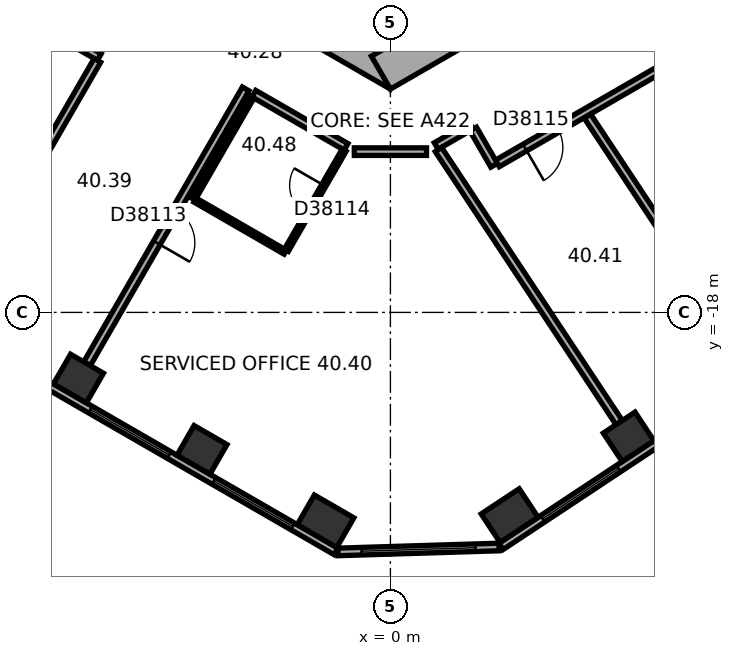
"""IFC4 building model, lengths in metres.
Left out: names, types, materials, properties, quantities, classifications, styles, units other than length and angle.
Written with IfcOpenShell. Run it as: python <this file> out.ifc"""

import sys

from ifc_helpers import new_model, si_unit, direction, frame, frame_2d, origin, origin_2d, place, context, subcontext, project, spatial, rectangle, extrude, element, fill, save


model = new_model("IFC4")
c1 = context("Model", 3, precision=1e-05, world=origin(), true_north=direction((0.0, 1.0)))
c2 = subcontext(c1, "Body", "Model", "MODEL_VIEW")
j1 = project(units=[si_unit("LENGTHUNIT", "METRE"), si_unit("PLANEANGLEUNIT", "RADIAN")], contexts=[c1])
p1 = place(None, origin())
s1 = spatial("IfcSite", under=j1, at=p1, CompositionType="ELEMENT")
p2 = place(p1, origin())
s2 = spatial("IfcBuilding", under=s1, at=p2, CompositionType="ELEMENT")
p3 = place(p2, frame((0.0, 0.0, 165.1)))
s3 = spatial("IfcBuildingStorey", under=s2, at=p3, CompositionType="ELEMENT", Elevation=165.1)
for number, where, z_axis, x_axis in (
    (1, (-8.208, -19.74, 0.0), (0.0, 0.0, 1.0), (0.866, -0.5, 0.0)),
    (2, (-4.958, -21.617, 0.0), (0.0, 0.0, 1.0), (0.866, -0.5, 0.0)),
):
    element("IfcColumn", number, at=place(p3, frame(where, z_axis=z_axis, x_axis=x_axis)), inside=s3, PredefinedType="COLUMN", context=c2, shape_type="SweptSolid", body=[
        extrude(rectangle(XDim=1.0, YDim=0.9, at=origin_2d()), origin(), (0.0, 0.0, 1.0), 3.7),
    ])
for number, where, z_axis, x_axis in (
    (3, (-1.706, -23.494, 0.0), (0.0, 0.0, 1.0), (0.866, -0.5, 0.0)),
    (4, (3.137, -23.346, 0.0), (0.0, 0.0, 1.0), (0.834, 0.552, 0.0)),
):
    element("IfcColumn", number, at=place(p3, frame(where, z_axis=z_axis, x_axis=x_axis)), inside=s3, PredefinedType="COLUMN", context=c2, shape_type="SweptSolid", body=[
        extrude(rectangle(XDim=1.2, YDim=0.9, at=origin_2d()), origin(), (0.0, 0.0, 1.0), 3.7),
    ])
p4 = place(p3, frame((6.268, -21.274, 0.0), z_axis=(0.0, 0.0, 1.0), x_axis=(0.833885822067, 0.551936985312, 0.0)))
e5 = element("IfcColumn", 5, at=p4, inside=s3, PredefinedType="COLUMN", context=c2, shape_type="SweptSolid", body=[
    extrude(rectangle(XDim=1.0, YDim=0.9, at=origin_2d()), origin(), (0.0, 0.0, 1.0), 3.7),
])
p5 = place(p3, frame((-10.25, -5.629, 0.0), z_axis=(0.0, 0.0, 1.0), x_axis=(0.866022616891, -0.50000482701, 0.0)))
e6 = element("IfcWall", 6, at=p5, inside=s3, PredefinedType="SHEAR", context=c2, shape_type="SweptSolid", body=[
    extrude(rectangle(XDim=12.125, YDim=1.0, at=frame_2d((6.062, 0.0))), origin(), (0.0, 0.0, 1.0), 3.7),
])
p6 = place(p5, frame((6.262, 0.0, 0.0)))
e7 = element("IfcOpeningElement", 7, at=p6, cuts=e6, PredefinedType="OPENING", context=c2, shape_type="SweptSolid", body=[
    extrude(rectangle(XDim=1.5, YDim=2.1, at=frame_2d((0.75, 1.05))), frame((0.0, 0.51, 0.0), z_axis=(0.0, -1.0, 0.0), x_axis=(1.0, 0.0, 0.0)), (0.0, 0.0, 1.0), 1.02),
])
p7 = place(p5, frame((1.712, 0.0, 0.0)))
e8 = element("IfcOpeningElement", 8, at=p7, cuts=e6, PredefinedType="OPENING", context=c2, shape_type="SweptSolid", body=[
    extrude(rectangle(XDim=1.1, YDim=2.1, at=frame_2d((0.55, 1.05))), frame((0.0, 0.51, 0.0), z_axis=(0.0, -1.0, 0.0), x_axis=(1.0, 0.0, 0.0)), (0.0, 0.0, 1.0), 1.02),
])
p8 = place(p5, frame((4.312, 0.0, 0.0)))
e9 = element("IfcOpeningElement", 9, at=p8, cuts=e6, PredefinedType="OPENING", context=c2, shape_type="SweptSolid", body=[
    extrude(rectangle(XDim=1.1, YDim=2.1, at=frame_2d((0.55, 1.05))), frame((0.0, 0.51, 0.0), z_axis=(0.0, -1.0, 0.0), x_axis=(1.0, 0.0, 0.0)), (0.0, 0.0, 1.0), 1.02),
])
p9 = place(p3, frame((-0.25, -11.691, 0.0), z_axis=(0.0, 0.0, 1.0), x_axis=(0.866022616891, 0.50000482701, 0.0)))
e10 = element("IfcWall", 10, at=p9, inside=s3, PredefinedType="SHEAR", context=c2, shape_type="SweptSolid", body=[
    extrude(rectangle(XDim=12.125, YDim=1.0, at=frame_2d((6.062, 0.0))), origin(), (0.0, 0.0, 1.0), 3.7),
])
p10 = place(p9, frame((2.612, 0.0, 0.0)))
e11 = element("IfcOpeningElement", 11, at=p10, cuts=e10, PredefinedType="OPENING", context=c2, shape_type="SweptSolid", body=[
    extrude(rectangle(XDim=1.1, YDim=2.1, at=frame_2d((0.55, 1.05))), frame((0.0, 0.51, 0.0), z_axis=(0.0, -1.0, 0.0), x_axis=(1.0, 0.0, 0.0)), (0.0, 0.0, 1.0), 1.02),
])
p11 = place(p9, frame((5.212, 0.0, 0.0)))
e12 = element("IfcOpeningElement", 12, at=p11, cuts=e10, PredefinedType="OPENING", context=c2, shape_type="SweptSolid", body=[
    extrude(rectangle(XDim=1.1, YDim=2.1, at=frame_2d((0.55, 1.05))), frame((0.0, 0.51, 0.0), z_axis=(0.0, -1.0, 0.0), x_axis=(1.0, 0.0, 0.0)), (0.0, 0.0, 1.0), 1.02),
])
p12 = place(p9, frame((7.812, 0.0, 0.0)))
e13 = element("IfcOpeningElement", 13, at=p12, cuts=e10, PredefinedType="OPENING", context=c2, shape_type="SweptSolid", body=[
    extrude(rectangle(XDim=1.1, YDim=2.1, at=frame_2d((0.55, 1.05))), frame((0.0, 0.51, 0.0), z_axis=(0.0, -1.0, 0.0), x_axis=(1.0, 0.0, 0.0)), (0.0, 0.0, 1.0), 1.02),
])
p13 = place(p3, frame((-18.789, -14.267, 0.0), z_axis=(0.0, 0.0, 1.0), x_axis=(0.866023315909, -0.500003616288, 0.0)))
e14 = element("IfcWall", 14, at=p13, inside=s3, PredefinedType="STANDARD", context=c2, shape_type="SweptSolid", body=[
    extrude(rectangle(XDim=20.044, YDim=0.2, at=frame_2d((10.022, 0.0))), origin(), (0.0, 0.0, 1.0), 3.7),
])
p14 = place(p13, frame((1.314, 0.0, 0.9)))
e15 = element("IfcOpeningElement", 15, at=p14, cuts=e14, PredefinedType="OPENING", context=c2, shape_type="SweptSolid", body=[
    extrude(rectangle(XDim=2.4, YDim=2.0, at=frame_2d((1.2, 1.0))), frame((0.0, 0.11, 0.0), z_axis=(0.0, -1.0, 0.0), x_axis=(1.0, 0.0, 0.0)), (0.0, 0.0, 1.0), 0.22),
])
p15 = place(p13, frame((5.069, 0.0, 0.9)))
e16 = element("IfcOpeningElement", 16, at=p15, cuts=e14, PredefinedType="OPENING", context=c2, shape_type="SweptSolid", body=[
    extrude(rectangle(XDim=2.4, YDim=2.0, at=frame_2d((1.2, 1.0))), frame((0.0, 0.11, 0.0), z_axis=(0.0, -1.0, 0.0), x_axis=(1.0, 0.0, 0.0)), (0.0, 0.0, 1.0), 0.22),
])
p16 = place(p13, frame((8.823, 0.0, 0.9)))
e17 = element("IfcOpeningElement", 17, at=p16, cuts=e14, PredefinedType="OPENING", context=c2, shape_type="SweptSolid", body=[
    extrude(rectangle(XDim=2.4, YDim=2.0, at=frame_2d((1.2, 1.0))), frame((0.0, 0.11, 0.0), z_axis=(0.0, -1.0, 0.0), x_axis=(1.0, 0.0, 0.0)), (0.0, 0.0, 1.0), 0.22),
])
p17 = place(p13, frame((12.577, 0.0, 0.9)))
e18 = element("IfcOpeningElement", 18, at=p17, cuts=e14, PredefinedType="OPENING", context=c2, shape_type="SweptSolid", body=[
    extrude(rectangle(XDim=2.4, YDim=2.0, at=frame_2d((1.2, 1.0))), frame((0.0, 0.11, 0.0), z_axis=(0.0, -1.0, 0.0), x_axis=(1.0, 0.0, 0.0)), (0.0, 0.0, 1.0), 0.22),
])
p18 = place(p13, frame((16.331, 0.0, 0.9)))
e19 = element("IfcOpeningElement", 19, at=p18, cuts=e14, PredefinedType="OPENING", context=c2, shape_type="SweptSolid", body=[
    extrude(rectangle(XDim=2.4, YDim=2.0, at=frame_2d((1.2, 1.0))), frame((0.0, 0.11, 0.0), z_axis=(0.0, -1.0, 0.0), x_axis=(1.0, 0.0, 0.0)), (0.0, 0.0, 1.0), 0.22),
])
p19 = place(p3, frame((-1.378, -24.302, 0.0), z_axis=(0.0, 0.0, 1.0), x_axis=(0.999533857267, 0.030529791629, 0.0)))
e20 = element("IfcWall", 20, at=p19, inside=s3, PredefinedType="STANDARD", context=c2, shape_type="SweptSolid", body=[
    extrude(rectangle(XDim=4.238, YDim=0.2, at=frame_2d((2.119, 0.0))), origin(), (0.0, 0.0, 1.0), 3.7),
])
p20 = place(p19, frame((0.619, 0.0, 0.9)))
e21 = element("IfcOpeningElement", 21, at=p20, cuts=e20, PredefinedType="OPENING", context=c2, shape_type="SweptSolid", body=[
    extrude(rectangle(XDim=3.0, YDim=2.0, at=frame_2d((1.5, 1.0))), frame((0.0, 0.11, 0.0), z_axis=(0.0, -1.0, 0.0), x_axis=(1.0, 0.0, 0.0)), (0.0, 0.0, 1.0), 0.22),
])
p21 = place(p3, frame((2.911, -24.156, 0.0), z_axis=(0.0, 0.0, 1.0), x_axis=(0.833882163564, 0.551942512668, 0.0)))
e22 = element("IfcWall", 22, at=p21, inside=s3, PredefinedType="STANDARD", context=c2, shape_type="SweptSolid", body=[
    extrude(rectangle(XDim=20.044, YDim=0.2, at=frame_2d((10.022, 0.0))), origin(), (0.0, 0.0, 1.0), 3.7),
])
p22 = place(p21, frame((1.313, 0.0, 0.9)))
e23 = element("IfcOpeningElement", 23, at=p22, cuts=e22, PredefinedType="OPENING", context=c2, shape_type="SweptSolid", body=[
    extrude(rectangle(XDim=2.4, YDim=2.0, at=frame_2d((1.2, 1.0))), frame((0.0, 0.11, 0.0), z_axis=(0.0, -1.0, 0.0), x_axis=(1.0, 0.0, 0.0)), (0.0, 0.0, 1.0), 0.22),
])
p23 = place(p21, frame((5.067, 0.0, 0.9)))
e24 = element("IfcOpeningElement", 24, at=p23, cuts=e22, PredefinedType="OPENING", context=c2, shape_type="SweptSolid", body=[
    extrude(rectangle(XDim=2.4, YDim=2.0, at=frame_2d((1.2, 1.0))), frame((0.0, 0.11, 0.0), z_axis=(0.0, -1.0, 0.0), x_axis=(1.0, 0.0, 0.0)), (0.0, 0.0, 1.0), 0.22),
])
p24 = place(p21, frame((8.821, 0.0, 0.9)))
e25 = element("IfcOpeningElement", 25, at=p24, cuts=e22, PredefinedType="OPENING", context=c2, shape_type="SweptSolid", body=[
    extrude(rectangle(XDim=2.4, YDim=2.0, at=frame_2d((1.2, 1.0))), frame((0.0, 0.11, 0.0), z_axis=(0.0, -1.0, 0.0), x_axis=(1.0, 0.0, 0.0)), (0.0, 0.0, 1.0), 0.22),
])
p25 = place(p21, frame((12.575, 0.0, 0.9)))
e26 = element("IfcOpeningElement", 26, at=p25, cuts=e22, PredefinedType="OPENING", context=c2, shape_type="SweptSolid", body=[
    extrude(rectangle(XDim=2.4, YDim=2.0, at=frame_2d((1.2, 1.0))), frame((0.0, 0.11, 0.0), z_axis=(0.0, -1.0, 0.0), x_axis=(1.0, 0.0, 0.0)), (0.0, 0.0, 1.0), 0.22),
])
p26 = place(p21, frame((16.329, 0.0, 0.9)))
e27 = element("IfcOpeningElement", 27, at=p26, cuts=e22, PredefinedType="OPENING", context=c2, shape_type="SweptSolid", body=[
    extrude(rectangle(XDim=2.4, YDim=2.0, at=frame_2d((1.2, 1.0))), frame((0.0, 0.11, 0.0), z_axis=(0.0, -1.0, 0.0), x_axis=(1.0, 0.0, 0.0)), (0.0, 0.0, 1.0), 0.22),
])
p27 = place(p3, frame((-11.651, -8.978, 0.0), z_axis=(0.0, 0.0, 1.0), x_axis=(0.866010893236, -0.500025132165, 0.0)))
e28 = element("IfcWall", 28, at=p27, inside=s3, PredefinedType="PARTITIONING", context=c2, shape_type="SweptSolid", body=[
    extrude(rectangle(XDim=4.608, YDim=0.2, at=frame_2d((2.304, 0.0))), origin(), (0.0, 0.0, 1.0), 3.42),
])
p28 = place(p3, frame((-11.235, -17.474, 0.0), z_axis=(0.0, 0.0, 1.0), x_axis=(0.500009260695, 0.866020057054, 0.0)))
e29 = element("IfcWall", 29, at=p28, inside=s3, PredefinedType="PARTITIONING", context=c2, shape_type="SweptSolid", body=[
    extrude(rectangle(XDim=7.049, YDim=0.2, at=frame_2d((3.524, 0.0))), origin(), (0.0, 0.0, 1.0), 2.87),
])
p29 = place(p28, frame((3.024, 0.0, 0.0)))
e30 = element("IfcOpeningElement", 30, at=p29, cuts=e29, PredefinedType="OPENING", context=c2, shape_type="SweptSolid", body=[
    extrude(rectangle(XDim=1.0, YDim=2.1, at=frame_2d((0.5, 1.05))), frame((0.0, 0.11, 0.0), z_axis=(0.0, -1.0, 0.0), x_axis=(1.0, 0.0, 0.0)), (0.0, 0.0, 1.0), 0.22),
])
p30 = place(p3, frame((-7.984, -19.351, 0.0), z_axis=(0.0, 0.0, 1.0), x_axis=(0.500010139422, 0.866019549707, 0.0)))
e31 = element("IfcWall", 31, at=p30, inside=s3, PredefinedType="PARTITIONING", context=c2, shape_type="SweptSolid", body=[
    extrude(rectangle(XDim=8.35, YDim=0.2, at=frame_2d((4.175, 0.0))), origin(), (0.0, 0.0, 1.0), 3.42),
])
p31 = place(p30, frame((3.675, 0.0, 0.0)))
e32 = element("IfcOpeningElement", 32, at=p31, cuts=e31, PredefinedType="OPENING", context=c2, shape_type="SweptSolid", body=[
    extrude(rectangle(XDim=1.0, YDim=2.1, at=frame_2d((0.5, 1.05))), frame((0.0, 0.11, 0.0), z_axis=(0.0, -1.0, 0.0), x_axis=(1.0, 0.0, 0.0)), (0.0, 0.0, 1.0), 0.22),
])
p32 = place(p3, frame((-5.192, -15.016, 0.0), z_axis=(0.0, 0.0, 1.0), x_axis=(0.500026960575, 0.86600983753, 0.0)))
e33 = element("IfcWall", 33, at=p32, inside=s3, PredefinedType="PARTITIONING", context=c2, shape_type="SweptSolid", body=[
    extrude(rectangle(XDim=3.1, YDim=0.12, at=frame_2d((1.55, 0.0))), origin(), (0.0, 0.0, 1.0), 3.42),
])
p33 = place(p3, frame((-3.592, -12.244, 0.0), z_axis=(0.0, 0.0, 1.0), x_axis=(0.866034573852, -0.49998411664, 0.0)))
e34 = element("IfcWall", 34, at=p33, inside=s3, PredefinedType="PARTITIONING", context=c2, shape_type="SweptSolid", body=[
    extrude(rectangle(XDim=2.8, YDim=0.2, at=frame_2d((1.4, 0.0))), origin(), (0.0, 0.0, 1.0), 3.42),
])
p34 = place(p3, frame((-2.767, -16.416, 0.0), z_axis=(0.0, 0.0, 1.0), x_axis=(-0.865997131366, 0.500048966069, 0.0)))
e35 = element("IfcWall", 35, at=p34, inside=s3, PredefinedType="PARTITIONING", context=c2, shape_type="SweptSolid", body=[
    extrude(rectangle(XDim=2.74, YDim=0.12, at=frame_2d((1.37, 0.0))), origin(), (0.0, 0.0, 1.0), 3.42),
])
p35 = place(p3, frame((-1.217, -13.731, 0.0), z_axis=(0.0, 0.0, 1.0), x_axis=(-0.499991248344, -0.866030456496, 0.0)))
e36 = element("IfcWall", 36, at=p35, inside=s3, PredefinedType="PARTITIONING", context=c2, shape_type="SweptSolid", body=[
    extrude(rectangle(XDim=3.04, YDim=0.12, at=frame_2d((1.52, 0.0))), origin(), (0.0, 0.0, 1.0), 3.42),
])
p36 = place(p35, frame((1.07, 0.0, 0.0)))
e37 = element("IfcOpeningElement", 37, at=p36, cuts=e36, PredefinedType="OPENING", context=c2, shape_type="SweptSolid", body=[
    extrude(rectangle(XDim=0.9, YDim=2.1, at=frame_2d((0.45, 1.05))), frame((0.0, 0.07, 0.0), z_axis=(0.0, -1.0, 0.0), x_axis=(1.0, 0.0, 0.0)), (0.0, 0.0, 1.0), 0.14),
])
p37 = place(p3, frame((-0.95, -13.77, 0.0), z_axis=(0.0, 0.0, 1.0), x_axis=(1.0, 0.0, 0.0)))
e38 = element("IfcWall", 38, at=p37, inside=s3, PredefinedType="PARTITIONING", context=c2, shape_type="SweptSolid", body=[
    extrude(rectangle(XDim=1.9, YDim=0.2, at=frame_2d((0.95, 0.0))), origin(), (0.0, 0.0, 1.0), 3.42),
])
p38 = place(p3, frame((1.204, -13.623, 0.0), z_axis=(0.0, 0.0, 1.0), x_axis=(0.866040989419, 0.499973003918, 0.0)))
e39 = element("IfcWall", 39, at=p38, inside=s3, PredefinedType="PARTITIONING", context=c2, shape_type="SweptSolid", body=[
    extrude(rectangle(XDim=1.068, YDim=0.2, at=frame_2d((0.534, 0.0))), origin(), (0.0, 0.0, 1.0), 3.42),
])
p39 = place(p3, frame((2.179, -13.176, 0.0), z_axis=(0.0, 0.0, 1.0), x_axis=(0.499978356969, -0.866037899034, 0.0)))
e40 = element("IfcWall", 40, at=p39, inside=s3, PredefinedType="PARTITIONING", context=c2, shape_type="SweptSolid", body=[
    extrude(rectangle(XDim=1.101, YDim=0.2, at=frame_2d((0.551, 0.0))), origin(), (0.0, 0.0, 1.0), 3.42),
])
p40 = place(p3, frame((2.816, -14.079, 0.0), z_axis=(0.0, 0.0, 1.0), x_axis=(0.866021128829, 0.500007404367, 0.0)))
e41 = element("IfcWall", 41, at=p40, inside=s3, PredefinedType="PARTITIONING", context=c2, shape_type="SweptSolid", body=[
    extrude(rectangle(XDim=8.702, YDim=0.2, at=frame_2d((4.351, 0.0))), origin(), (0.0, 0.0, 1.0), 3.42),
])
p41 = place(p40, frame((0.833, 0.0, 0.0)))
e42 = element("IfcOpeningElement", 42, at=p41, cuts=e41, PredefinedType="OPENING", context=c2, shape_type="SweptSolid", body=[
    extrude(rectangle(XDim=1.0, YDim=2.1, at=frame_2d((0.5, 1.05))), frame((0.0, 0.11, 0.0), z_axis=(0.0, -1.0, 0.0), x_axis=(1.0, 0.0, 0.0)), (0.0, 0.0, 1.0), 0.22),
])
p42 = place(p3, frame((6.02, -20.899, 0.0), z_axis=(0.0, 0.0, 1.0), x_axis=(-0.551943990108, 0.833881185651, 0.0)))
e43 = element("IfcWall", 43, at=p42, inside=s3, PredefinedType="PARTITIONING", context=c2, shape_type="SweptSolid", body=[
    extrude(rectangle(XDim=8.615, YDim=0.2, at=frame_2d((4.308, 0.0))), origin(), (0.0, 0.0, 1.0), 3.42),
])
p43 = place(p3, frame((9.15, -18.827, 0.0), z_axis=(0.0, 0.0, 1.0), x_axis=(-0.551928083938, 0.83389171369, 0.0)))
e44 = element("IfcWall", 44, at=p43, inside=s3, PredefinedType="PARTITIONING", context=c2, shape_type="SweptSolid", body=[
    extrude(rectangle(XDim=7.182, YDim=0.2, at=frame_2d((3.591, 0.0))), origin(), (0.0, 0.0, 1.0), 2.87),
])
p44 = place(p17, origin())
e45 = element("IfcWindow", 45, at=p44, inside=s3, PartitioningType="SINGLE_PANEL", PredefinedType="WINDOW", context=c2, shape_type="SweptSolid", body=[
    extrude(rectangle(XDim=2.4, YDim=2.0, at=frame_2d((1.2, 1.0))), frame((0.0, 0.03, 0.0), z_axis=(0.0, -1.0, 0.0), x_axis=(1.0, 0.0, 0.0)), (0.0, 0.0, 1.0), 0.06),
])
fill(e18, e45)
p45 = place(p18, origin())
e46 = element("IfcWindow", 46, at=p45, inside=s3, PartitioningType="SINGLE_PANEL", PredefinedType="WINDOW", context=c2, shape_type="SweptSolid", body=[
    extrude(rectangle(XDim=2.4, YDim=2.0, at=frame_2d((1.2, 1.0))), frame((0.0, 0.03, 0.0), z_axis=(0.0, -1.0, 0.0), x_axis=(1.0, 0.0, 0.0)), (0.0, 0.0, 1.0), 0.06),
])
fill(e19, e46)
p46 = place(p20, origin())
e47 = element("IfcWindow", 47, at=p46, inside=s3, PartitioningType="SINGLE_PANEL", PredefinedType="WINDOW", context=c2, shape_type="SweptSolid", body=[
    extrude(rectangle(XDim=3.0, YDim=2.0, at=frame_2d((1.5, 1.0))), frame((0.0, 0.03, 0.0), z_axis=(0.0, -1.0, 0.0), x_axis=(1.0, 0.0, 0.0)), (0.0, 0.0, 1.0), 0.06),
])
fill(e21, e47)
p47 = place(p22, origin())
e48 = element("IfcWindow", 48, at=p47, inside=s3, PartitioningType="SINGLE_PANEL", PredefinedType="WINDOW", context=c2, shape_type="SweptSolid", body=[
    extrude(rectangle(XDim=2.4, YDim=2.0, at=frame_2d((1.2, 1.0))), frame((0.0, 0.03, 0.0), z_axis=(0.0, -1.0, 0.0), x_axis=(1.0, 0.0, 0.0)), (0.0, 0.0, 1.0), 0.06),
])
fill(e23, e48)
p48 = place(p31, origin())
e49 = element("IfcDoor", 49, at=p48, inside=s3, OperationType="SINGLE_SWING_LEFT", PredefinedType="DOOR", context=c2, shape_type="SweptSolid", body=[
    extrude(rectangle(XDim=1.0, YDim=2.1, at=frame_2d((0.5, 1.05))), frame((0.0, 0.025, 0.0), z_axis=(0.0, -1.0, 0.0), x_axis=(1.0, 0.0, 0.0)), (0.0, 0.0, 1.0), 0.05),
])
fill(e32, e49)
p49 = place(p36, origin())
e50 = element("IfcDoor", 50, at=p49, inside=s3, OperationType="SINGLE_SWING_LEFT", PredefinedType="DOOR", context=c2, shape_type="SweptSolid", body=[
    extrude(rectangle(XDim=0.9, YDim=2.1, at=frame_2d((0.45, 1.05))), frame((0.0, 0.025, 0.0), z_axis=(0.0, -1.0, 0.0), x_axis=(1.0, 0.0, 0.0)), (0.0, 0.0, 1.0), 0.05),
])
fill(e37, e50)
p50 = place(p41, origin())
e51 = element("IfcDoor", 51, at=p50, inside=s3, OperationType="SINGLE_SWING_LEFT", PredefinedType="DOOR", context=c2, shape_type="SweptSolid", body=[
    extrude(rectangle(XDim=1.0, YDim=2.1, at=frame_2d((0.5, 1.05))), frame((0.0, 0.025, 0.0), z_axis=(0.0, -1.0, 0.0), x_axis=(1.0, 0.0, 0.0)), (0.0, 0.0, 1.0), 0.05),
])
fill(e42, e51)
save(model, sys.argv[1])
